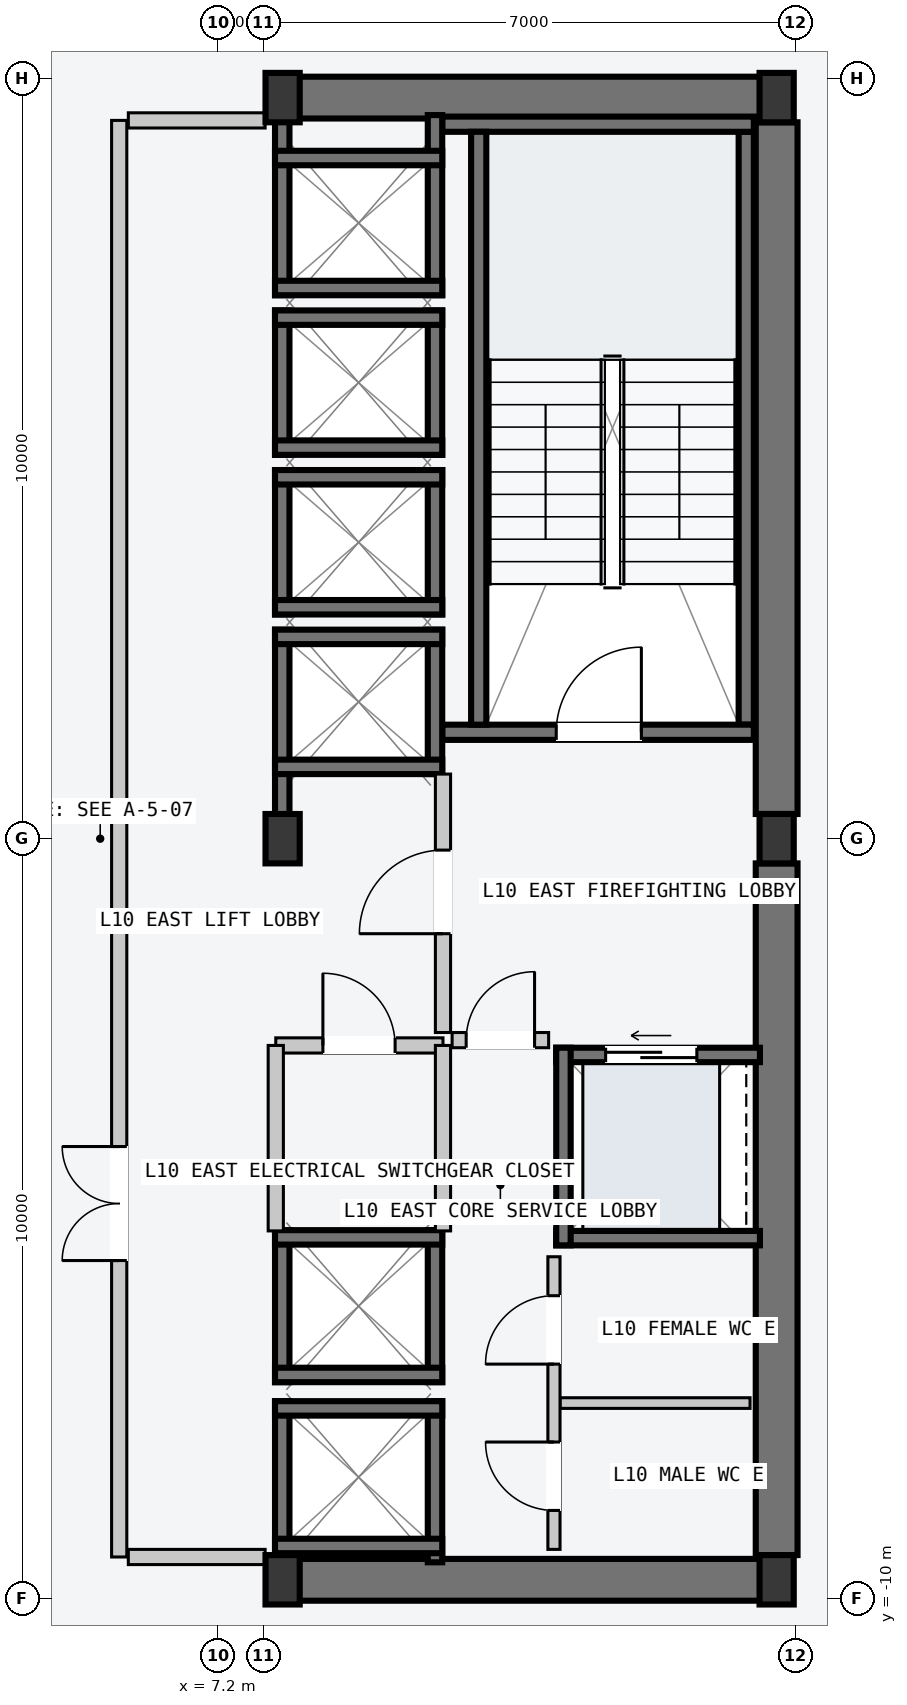
"""IFC4 building model, lengths in metres.
Left out: names, types, materials, properties, quantities, classifications, styles, units other than length and angle.
Written with IfcOpenShell. Run it as: python <this file> out.ifc"""

import sys

from ifc_helpers import new_model, si_unit, direction, frame, frame_2d, origin, origin_2d, place, context, subcontext, project, spatial, rectangle, i_section, extrude, element, fill, save


model = new_model("IFC4")
c1 = context("Model", 3, precision=1e-05, world=origin(), true_north=direction((0.0, 1.0)))
c2 = subcontext(c1, "Body", "Model", "MODEL_VIEW")
j1 = project(units=[si_unit("LENGTHUNIT", "METRE"), si_unit("PLANEANGLEUNIT", "RADIAN")], contexts=[c1])
p1 = place(None, origin())
s1 = spatial("IfcSite", under=j1, at=p1, CompositionType="ELEMENT")
p2 = place(p1, origin())
s2 = spatial("IfcBuilding", under=s1, at=p2, CompositionType="ELEMENT")
p3 = place(p2, frame((0.0, 0.0, 42.0)))
s3 = spatial("IfcBuildingStorey", under=s2, at=p3, CompositionType="ELEMENT", Elevation=42.0)
for number, where, z_axis, x_axis in (
    (1, (8.07, -9.75, -0.2), (0.0, 0.0, 1.0), (1.0, 0.0, 0.0)),
    (2, (8.07, 9.75, -0.2), (0.0, 0.0, 1.0), (1.0, 0.0, 0.0)),
):
    element("IfcWall", number, at=place(p3, frame(where, z_axis=z_axis, x_axis=x_axis)), inside=s3, PredefinedType="SHEAR", context=c2, shape_type="SweptSolid", body=[
        extrude(rectangle(XDim=6.46, YDim=0.55, at=frame_2d((3.23, 0.0))), origin(), (0.0, 0.0, 1.0), 3.6),
    ])
for number, where, z_axis, x_axis in (
    (3, (14.55, -9.425, -0.2), (0.0, 0.0, 1.0), (0.0, 1.0, 0.0)),
    (4, (14.55, 0.325, -0.2), (0.0, 0.0, 1.0), (0.0, 1.0, 0.0)),
):
    element("IfcWall", number, at=place(p3, frame(where, z_axis=z_axis, x_axis=x_axis)), inside=s3, PredefinedType="SHEAR", context=c2, shape_type="SweptSolid", body=[
        extrude(rectangle(XDim=9.1, YDim=0.55, at=frame_2d((4.55, 0.0))), origin(), (0.0, 0.0, 1.0), 3.6),
    ])
p4 = place(p3, frame((14.15, 1.5, -0.2), z_axis=(0.0, 0.0, 1.0), x_axis=(0.0, 1.0, 0.0)))
e5 = element("IfcWall", 5, at=p4, inside=s3, PredefinedType="SOLIDWALL", context=c2, shape_type="SweptSolid", body=[
    extrude(rectangle(XDim=7.8, YDim=0.2, at=frame_2d((3.9, 0.0))), origin(), (0.0, 0.0, 1.0), 3.6),
])
p5 = place(p3, frame((10.15, 1.4, -0.2), z_axis=(0.0, 0.0, 1.0), x_axis=(1.0, 0.0, 0.0)))
e6 = element("IfcWall", 6, at=p5, inside=s3, PredefinedType="SOLIDWALL", context=c2, shape_type="SweptSolid", body=[
    extrude(rectangle(XDim=4.1, YDim=0.2, at=frame_2d((2.05, 0.0))), origin(), (0.0, 0.0, 1.0), 3.6),
])
p6 = place(p5, frame((1.5, 0.0, 0.2)))
e7 = element("IfcOpeningElement", 7, at=p6, cuts=e6, PredefinedType="OPENING", context=c2, shape_type="SweptSolid", body=[
    extrude(rectangle(XDim=1.12, YDim=2.18, at=frame_2d((0.56, 1.09))), frame((0.0, 0.11, 0.0), z_axis=(0.0, -1.0, 0.0), x_axis=(1.0, 0.0, 0.0)), (0.0, 0.0, 1.0), 0.22),
])
p7 = place(p3, frame((10.15, 9.4, -0.2), z_axis=(0.0, 0.0, 1.0), x_axis=(1.0, 0.0, 0.0)))
e8 = element("IfcWall", 8, at=p7, inside=s3, PredefinedType="SOLIDWALL", context=c2, shape_type="SweptSolid", body=[
    extrude(rectangle(XDim=4.1, YDim=0.2, at=frame_2d((2.05, 0.0))), origin(), (0.0, 0.0, 1.0), 3.6),
])
p8 = place(p3, frame((10.63, 1.5, -0.2), z_axis=(0.0, 0.0, 1.0), x_axis=(0.0, 1.0, 0.0)))
e9 = element("IfcWall", 9, at=p8, inside=s3, PredefinedType="SOLIDWALL", context=c2, shape_type="SweptSolid", body=[
    extrude(rectangle(XDim=7.8, YDim=0.2, at=frame_2d((3.9, 0.0))), origin(), (0.0, 0.0, 1.0), 3.6),
])
for number, where, z_axis, x_axis in (
    (10, (8.05, -9.75, 0.0), (0.0, 0.0, 1.0), (1.0, 0.0, 0.0)),
    (11, (8.05, 0.0, 0.0), (0.0, 0.0, 1.0), (1.0, 0.0, 0.0)),
    (12, (8.05, 9.75, 0.0), (0.0, 0.0, 1.0), (1.0, 0.0, 0.0)),
    (13, (14.55, -9.75, 0.0), (0.0, 0.0, 1.0), (1.0, 0.0, 0.0)),
    (14, (14.55, 0.0, 0.0), (0.0, 0.0, 1.0), (1.0, 0.0, 0.0)),
    (15, (14.55, 9.75, 0.0), (0.0, 0.0, 1.0), (1.0, 0.0, 0.0)),
):
    element("IfcColumn", number, at=place(p3, frame(where, z_axis=z_axis, x_axis=x_axis)), inside=s3, PredefinedType="COLUMN", context=c2, shape_type="SweptSolid", body=[
        extrude(i_section(OverallWidth=0.45, OverallDepth=0.65, WebThickness=0.025, FlangeThickness=0.04, at=origin_2d()), origin(), (0.0, 0.0, 1.0), 3.6),
    ])
p9 = place(p3, frame((8.045, 0.21, -0.2), z_axis=(0.0, 0.0, 1.0), x_axis=(0.0, 1.0, 0.0)))
e16 = element("IfcWall", 16, at=p9, inside=s3, PredefinedType="SOLIDWALL", context=c2, shape_type="SweptSolid", body=[
    extrude(rectangle(XDim=2.54, YDim=0.19, at=frame_2d((1.27, 0.0))), origin(), (0.0, 0.0, 1.0), 3.6),
])
p10 = place(p3, frame((10.055, 0.85, -0.2), z_axis=(0.0, 0.0, 1.0), x_axis=(0.0, 1.0, 0.0)))
e17 = element("IfcWall", 17, at=p10, inside=s3, PredefinedType="SOLIDWALL", context=c2, shape_type="SweptSolid", body=[
    extrude(rectangle(XDim=1.9, YDim=0.19, at=frame_2d((0.95, 0.0))), origin(), (0.0, 0.0, 1.0), 3.6),
])
for number, where, z_axis, x_axis in (
    (18, (7.95, 2.655, -0.2), (0.0, 0.0, 1.0), (1.0, 0.0, 0.0)),
    (19, (7.95, 0.945, -0.2), (0.0, 0.0, 1.0), (1.0, 0.0, 0.0)),
):
    element("IfcWall", number, at=place(p3, frame(where, z_axis=z_axis, x_axis=x_axis)), inside=s3, PredefinedType="SOLIDWALL", context=c2, shape_type="SweptSolid", body=[
        extrude(rectangle(XDim=2.2, YDim=0.19, at=frame_2d((1.1, 0.0))), origin(), (0.0, 0.0, 1.0), 3.6),
    ])
for number, where, z_axis, x_axis in (
    (20, (8.045, 2.95, -0.2), (0.0, 0.0, 1.0), (0.0, 1.0, 0.0)),
    (21, (10.055, 2.95, -0.2), (0.0, 0.0, 1.0), (0.0, 1.0, 0.0)),
):
    element("IfcWall", number, at=place(p3, frame(where, z_axis=z_axis, x_axis=x_axis)), inside=s3, PredefinedType="SOLIDWALL", context=c2, shape_type="SweptSolid", body=[
        extrude(rectangle(XDim=1.9, YDim=0.19, at=frame_2d((0.95, 0.0))), origin(), (0.0, 0.0, 1.0), 3.6),
    ])
for number, where, z_axis, x_axis in (
    (22, (7.95, 4.755, -0.2), (0.0, 0.0, 1.0), (1.0, 0.0, 0.0)),
    (23, (7.95, 3.045, -0.2), (0.0, 0.0, 1.0), (1.0, 0.0, 0.0)),
):
    element("IfcWall", number, at=place(p3, frame(where, z_axis=z_axis, x_axis=x_axis)), inside=s3, PredefinedType="SOLIDWALL", context=c2, shape_type="SweptSolid", body=[
        extrude(rectangle(XDim=2.2, YDim=0.19, at=frame_2d((1.1, 0.0))), origin(), (0.0, 0.0, 1.0), 3.6),
    ])
for number, where, z_axis, x_axis in (
    (24, (8.045, 5.05, -0.2), (0.0, 0.0, 1.0), (0.0, 1.0, 0.0)),
    (25, (10.055, 5.05, -0.2), (0.0, 0.0, 1.0), (0.0, 1.0, 0.0)),
):
    element("IfcWall", number, at=place(p3, frame(where, z_axis=z_axis, x_axis=x_axis)), inside=s3, PredefinedType="SOLIDWALL", context=c2, shape_type="SweptSolid", body=[
        extrude(rectangle(XDim=1.9, YDim=0.19, at=frame_2d((0.95, 0.0))), origin(), (0.0, 0.0, 1.0), 3.6),
    ])
for number, where, z_axis, x_axis in (
    (26, (7.95, 6.855, -0.2), (0.0, 0.0, 1.0), (1.0, 0.0, 0.0)),
    (27, (7.95, 5.145, -0.2), (0.0, 0.0, 1.0), (1.0, 0.0, 0.0)),
):
    element("IfcWall", number, at=place(p3, frame(where, z_axis=z_axis, x_axis=x_axis)), inside=s3, PredefinedType="SOLIDWALL", context=c2, shape_type="SweptSolid", body=[
        extrude(rectangle(XDim=2.2, YDim=0.19, at=frame_2d((1.1, 0.0))), origin(), (0.0, 0.0, 1.0), 3.6),
    ])
for number, where, z_axis, x_axis in (
    (28, (8.045, 7.15, -0.2), (0.0, 0.0, 1.0), (0.0, 1.0, 0.0)),
    (29, (10.055, 7.15, -0.2), (0.0, 0.0, 1.0), (0.0, 1.0, 0.0)),
):
    element("IfcWall", number, at=place(p3, frame(where, z_axis=z_axis, x_axis=x_axis)), inside=s3, PredefinedType="SOLIDWALL", context=c2, shape_type="SweptSolid", body=[
        extrude(rectangle(XDim=2.37, YDim=0.19, at=frame_2d((1.185, 0.0))), origin(), (0.0, 0.0, 1.0), 3.6),
    ])
for number, where, z_axis, x_axis in (
    (30, (7.95, 8.955, -0.2), (0.0, 0.0, 1.0), (1.0, 0.0, 0.0)),
    (31, (7.95, 7.245, -0.2), (0.0, 0.0, 1.0), (1.0, 0.0, 0.0)),
):
    element("IfcWall", number, at=place(p3, frame(where, z_axis=z_axis, x_axis=x_axis)), inside=s3, PredefinedType="SOLIDWALL", context=c2, shape_type="SweptSolid", body=[
        extrude(rectangle(XDim=2.2, YDim=0.19, at=frame_2d((1.1, 0.0))), origin(), (0.0, 0.0, 1.0), 3.6),
    ])
for number, where, z_axis, x_axis in (
    (32, (8.045, -9.52, -0.2), (0.0, 0.0, 1.0), (0.0, 1.0, 0.0)),
    (33, (10.055, -9.52, -0.2), (0.0, 0.0, 1.0), (0.0, 1.0, 0.0)),
):
    element("IfcWall", number, at=place(p3, frame(where, z_axis=z_axis, x_axis=x_axis)), inside=s3, PredefinedType="SOLIDWALL", context=c2, shape_type="SweptSolid", body=[
        extrude(rectangle(XDim=2.12, YDim=0.19, at=frame_2d((1.06, 0.0))), origin(), (0.0, 0.0, 1.0), 3.6),
    ])
for number, where, z_axis, x_axis in (
    (34, (7.95, -7.495, -0.2), (0.0, 0.0, 1.0), (1.0, 0.0, 0.0)),
    (35, (7.95, -9.305, -0.2), (0.0, 0.0, 1.0), (1.0, 0.0, 0.0)),
):
    element("IfcWall", number, at=place(p3, frame(where, z_axis=z_axis, x_axis=x_axis)), inside=s3, PredefinedType="SOLIDWALL", context=c2, shape_type="SweptSolid", body=[
        extrude(rectangle(XDim=2.2, YDim=0.19, at=frame_2d((1.1, 0.0))), origin(), (0.0, 0.0, 1.0), 3.6),
    ])
for number, where, z_axis, x_axis in (
    (36, (8.045, -7.15, -0.2), (0.0, 0.0, 1.0), (0.0, 1.0, 0.0)),
    (37, (10.055, -7.15, -0.2), (0.0, 0.0, 1.0), (0.0, 1.0, 0.0)),
):
    element("IfcWall", number, at=place(p3, frame(where, z_axis=z_axis, x_axis=x_axis)), inside=s3, PredefinedType="SOLIDWALL", context=c2, shape_type="SweptSolid", body=[
        extrude(rectangle(XDim=2.0, YDim=0.19, at=frame_2d((1.0, 0.0))), origin(), (0.0, 0.0, 1.0), 3.6),
    ])
for number, where, z_axis, x_axis in (
    (38, (7.95, -5.245, -0.2), (0.0, 0.0, 1.0), (1.0, 0.0, 0.0)),
    (39, (7.95, -7.055, -0.2), (0.0, 0.0, 1.0), (1.0, 0.0, 0.0)),
):
    element("IfcWall", number, at=place(p3, frame(where, z_axis=z_axis, x_axis=x_axis)), inside=s3, PredefinedType="SOLIDWALL", context=c2, shape_type="SweptSolid", body=[
        extrude(rectangle(XDim=2.2, YDim=0.19, at=frame_2d((1.1, 0.0))), origin(), (0.0, 0.0, 1.0), 3.6),
    ])
p11 = place(p3, frame((11.65, -2.845, -0.2), z_axis=(0.0, 0.0, 1.0), x_axis=(1.0, 0.0, 0.0)))
e40 = element("IfcWall", 40, at=p11, inside=s3, PredefinedType="SOLIDWALL", context=c2, shape_type="SweptSolid", body=[
    extrude(rectangle(XDim=2.68, YDim=0.19, at=frame_2d((1.34, 0.0))), origin(), (0.0, 0.0, 1.0), 3.6),
])
p12 = place(p11, frame((0.65, 0.0, 0.2)))
e41 = element("IfcOpeningElement", 41, at=p12, cuts=e40, PredefinedType="OPENING", context=c2, shape_type="SweptSolid", body=[
    extrude(rectangle(XDim=1.2, YDim=2.2, at=frame_2d((0.6, 1.1))), frame((0.0, 0.105, 0.0), z_axis=(0.0, -1.0, 0.0), x_axis=(1.0, 0.0, 0.0)), (0.0, 0.0, 1.0), 0.21),
])
p13 = place(p3, frame((11.65, -5.255, -0.2), z_axis=(0.0, 0.0, 1.0), x_axis=(1.0, 0.0, 0.0)))
e42 = element("IfcWall", 42, at=p13, inside=s3, PredefinedType="SOLIDWALL", context=c2, shape_type="SweptSolid", body=[
    extrude(rectangle(XDim=2.68, YDim=0.19, at=frame_2d((1.34, 0.0))), origin(), (0.0, 0.0, 1.0), 3.6),
])
p14 = place(p3, frame((11.745, -5.35, -0.2), z_axis=(0.0, 0.0, 1.0), x_axis=(0.0, 1.0, 0.0)))
e43 = element("IfcWall", 43, at=p14, inside=s3, PredefinedType="SOLIDWALL", context=c2, shape_type="SweptSolid", body=[
    extrude(rectangle(XDim=2.6, YDim=0.19, at=frame_2d((1.3, 0.0))), origin(), (0.0, 0.0, 1.0), 3.6),
])
p15 = place(p3, frame((5.9, -9.45, 0.0), z_axis=(0.0, 0.0, 1.0), x_axis=(0.0, 1.0, 0.0)))
e44 = element("IfcWall", 44, at=p15, inside=s3, PredefinedType="PARTITIONING", context=c2, shape_type="SweptSolid", body=[
    extrude(rectangle(XDim=18.9, YDim=0.2, at=frame_2d((9.45, 0.0))), origin(), (0.0, 0.0, 1.0), 3.4),
])
p16 = place(p15, frame((3.9, 0.0, 0.0)))
e45 = element("IfcOpeningElement", 45, at=p16, cuts=e44, PredefinedType="OPENING", context=c2, shape_type="SweptSolid", body=[
    extrude(rectangle(XDim=1.5, YDim=2.2, at=frame_2d((0.75, 1.1))), frame((0.0, 0.11, 0.0), z_axis=(0.0, -1.0, 0.0), x_axis=(1.0, 0.0, 0.0)), (0.0, 0.0, 1.0), 0.22),
])
for number, where, z_axis, x_axis in (
    (46, (6.02, -9.45, 0.0), (0.0, 0.0, 1.0), (1.0, 0.0, 0.0)),
    (47, (6.02, 9.45, 0.0), (0.0, 0.0, 1.0), (1.0, 0.0, 0.0)),
):
    element("IfcWall", number, at=place(p3, frame(where, z_axis=z_axis, x_axis=x_axis)), inside=s3, PredefinedType="PARTITIONING", context=c2, shape_type="SweptSolid", body=[
        extrude(rectangle(XDim=1.8, YDim=0.2, at=frame_2d((0.9, 0.0))), origin(), (0.0, 0.0, 1.0), 3.4),
    ])
p17 = place(p3, frame((10.16, -2.55, 0.0), z_axis=(0.0, 0.0, 1.0), x_axis=(0.0, 1.0, 0.0)))
e48 = element("IfcWall", 48, at=p17, inside=s3, PredefinedType="PARTITIONING", context=c2, shape_type="SweptSolid", body=[
    extrude(rectangle(XDim=3.4, YDim=0.2, at=frame_2d((1.7, 0.0))), origin(), (0.0, 0.0, 1.0), 3.4),
])
p18 = place(p17, frame((1.3, 0.0, 0.0)))
e49 = element("IfcOpeningElement", 49, at=p18, cuts=e48, PredefinedType="OPENING", context=c2, shape_type="SweptSolid", body=[
    extrude(rectangle(XDim=1.1, YDim=2.15, at=frame_2d((0.55, 1.075))), frame((0.0, 0.11, 0.0), z_axis=(0.0, -1.0, 0.0), x_axis=(1.0, 0.0, 0.0)), (0.0, 0.0, 1.0), 0.22),
])
p19 = place(p3, frame((10.28, -2.65, 0.0), z_axis=(0.0, 0.0, 1.0), x_axis=(1.0, 0.0, 0.0)))
e50 = element("IfcWall", 50, at=p19, inside=s3, PredefinedType="PARTITIONING", context=c2, shape_type="SweptSolid", body=[
    extrude(rectangle(XDim=1.27, YDim=0.2, at=frame_2d((0.635, 0.0))), origin(), (0.0, 0.0, 1.0), 3.4),
])
p20 = place(p19, frame((0.185, 0.0, 0.0)))
e51 = element("IfcOpeningElement", 51, at=p20, cuts=e50, PredefinedType="OPENING", context=c2, shape_type="SweptSolid", body=[
    extrude(rectangle(XDim=0.9, YDim=2.15, at=frame_2d((0.45, 1.075))), frame((0.0, 0.11, 0.0), z_axis=(0.0, -1.0, 0.0), x_axis=(1.0, 0.0, 0.0)), (0.0, 0.0, 1.0), 0.22),
])
p21 = place(p3, frame((7.96, -2.72, 0.0), z_axis=(0.0, 0.0, 1.0), x_axis=(1.0, 0.0, 0.0)))
e52 = element("IfcWall", 52, at=p21, inside=s3, PredefinedType="PARTITIONING", context=c2, shape_type="SweptSolid", body=[
    extrude(rectangle(XDim=2.2, YDim=0.2, at=frame_2d((1.1, 0.0))), origin(), (0.0, 0.0, 1.0), 3.4),
])
p22 = place(p21, frame((0.62, 0.0, 0.0)))
e53 = element("IfcOpeningElement", 53, at=p22, cuts=e52, PredefinedType="OPENING", context=c2, shape_type="SweptSolid", body=[
    extrude(rectangle(XDim=0.95, YDim=2.1, at=frame_2d((0.475, 1.05))), frame((0.0, 0.11, 0.0), z_axis=(0.0, -1.0, 0.0), x_axis=(1.0, 0.0, 0.0)), (0.0, 0.0, 1.0), 0.22),
])
for number, where, z_axis, x_axis in (
    (54, (7.96, -5.16, 0.0), (0.0, 0.0, 1.0), (0.0, 1.0, 0.0)),
    (55, (10.16, -5.16, 0.0), (0.0, 0.0, 1.0), (0.0, 1.0, 0.0)),
):
    element("IfcWall", number, at=place(p3, frame(where, z_axis=z_axis, x_axis=x_axis)), inside=s3, PredefinedType="PARTITIONING", context=c2, shape_type="SweptSolid", body=[
        extrude(rectangle(XDim=2.44, YDim=0.2, at=frame_2d((1.22, 0.0))), origin(), (0.0, 0.0, 1.0), 3.4),
    ])
p23 = place(p3, frame((11.7, -7.425, 0.0), z_axis=(0.0, 0.0, 1.0), x_axis=(1.0, 0.0, 0.0)))
e56 = element("IfcWall", 56, at=p23, inside=s3, PredefinedType="PARTITIONING", context=c2, shape_type="SweptSolid", body=[
    extrude(rectangle(XDim=2.5, YDim=0.14, at=frame_2d((1.25, 0.0))), origin(), (0.0, 0.0, 1.0), 3.4),
])
p24 = place(p3, frame((11.62, -9.35, 0.0), z_axis=(0.0, 0.0, 1.0), x_axis=(0.0, 1.0, 0.0)))
e57 = element("IfcWall", 57, at=p24, inside=s3, PredefinedType="PARTITIONING", context=c2, shape_type="SweptSolid", body=[
    extrude(rectangle(XDim=3.85, YDim=0.16, at=frame_2d((1.925, 0.0))), origin(), (0.0, 0.0, 1.0), 3.4),
])
p25 = place(p24, frame((0.512, 0.0, 0.0)))
e58 = element("IfcOpeningElement", 58, at=p25, cuts=e57, PredefinedType="OPENING", context=c2, shape_type="SweptSolid", body=[
    extrude(rectangle(XDim=0.9, YDim=2.15, at=frame_2d((0.45, 1.075))), frame((0.0, 0.09, 0.0), z_axis=(0.0, -1.0, 0.0), x_axis=(1.0, 0.0, 0.0)), (0.0, 0.0, 1.0), 0.18),
])
p26 = place(p24, frame((2.438, 0.0, 0.0)))
e59 = element("IfcOpeningElement", 59, at=p26, cuts=e57, PredefinedType="OPENING", context=c2, shape_type="SweptSolid", body=[
    extrude(rectangle(XDim=0.9, YDim=2.15, at=frame_2d((0.45, 1.075))), frame((0.0, 0.09, 0.0), z_axis=(0.0, -1.0, 0.0), x_axis=(1.0, 0.0, 0.0)), (0.0, 0.0, 1.0), 0.18),
])
p27 = place(p6, origin())
e60 = element("IfcDoor", 60, at=p27, inside=s3, OperationType="SINGLE_SWING_RIGHT", PredefinedType="DOOR", context=c2, shape_type="SweptSolid", body=[
    extrude(rectangle(XDim=1.12, YDim=2.18, at=frame_2d((0.56, 1.09))), frame((0.0, 0.025, 0.0), z_axis=(0.0, -1.0, 0.0), x_axis=(1.0, 0.0, 0.0)), (0.0, 0.0, 1.0), 0.05),
])
fill(e7, e60)
p28 = place(p12, origin())
e61 = element("IfcDoor", 61, at=p28, inside=s3, OperationType="SLIDING_TO_LEFT", PredefinedType="DOOR", context=c2, shape_type="SweptSolid", body=[
    extrude(rectangle(XDim=1.2, YDim=2.2, at=frame_2d((0.6, 1.1))), frame((0.0, 0.025, 0.0), z_axis=(0.0, -1.0, 0.0), x_axis=(1.0, 0.0, 0.0)), (0.0, 0.0, 1.0), 0.05),
])
fill(e41, e61)
p29 = place(p16, origin())
e62 = element("IfcDoor", 62, at=p29, inside=s3, OperationType="DOUBLE_DOOR_SINGLE_SWING", PredefinedType="DOOR", context=c2, shape_type="SweptSolid", body=[
    extrude(rectangle(XDim=1.5, YDim=2.2, at=frame_2d((0.75, 1.1))), frame((0.0, 0.025, 0.0), z_axis=(0.0, -1.0, 0.0), x_axis=(1.0, 0.0, 0.0)), (0.0, 0.0, 1.0), 0.05),
])
fill(e45, e62)
p30 = place(p18, origin())
e63 = element("IfcDoor", 63, at=p30, inside=s3, OperationType="SINGLE_SWING_LEFT", PredefinedType="DOOR", context=c2, shape_type="SweptSolid", body=[
    extrude(rectangle(XDim=1.1, YDim=2.15, at=frame_2d((0.55, 1.075))), frame((0.0, 0.025, 0.0), z_axis=(0.0, -1.0, 0.0), x_axis=(1.0, 0.0, 0.0)), (0.0, 0.0, 1.0), 0.05),
])
fill(e49, e63)
p31 = place(p20, origin())
e64 = element("IfcDoor", 64, at=p31, inside=s3, OperationType="SINGLE_SWING_RIGHT", PredefinedType="DOOR", context=c2, shape_type="SweptSolid", body=[
    extrude(rectangle(XDim=0.9, YDim=2.15, at=frame_2d((0.45, 1.075))), frame((0.0, 0.025, 0.0), z_axis=(0.0, -1.0, 0.0), x_axis=(1.0, 0.0, 0.0)), (0.0, 0.0, 1.0), 0.05),
])
fill(e51, e64)
p32 = place(p22, origin())
e65 = element("IfcDoor", 65, at=p32, inside=s3, OperationType="SINGLE_SWING_LEFT", PredefinedType="DOOR", context=c2, shape_type="SweptSolid", body=[
    extrude(rectangle(XDim=0.95, YDim=2.1, at=frame_2d((0.475, 1.05))), frame((0.0, 0.025, 0.0), z_axis=(0.0, -1.0, 0.0), x_axis=(1.0, 0.0, 0.0)), (0.0, 0.0, 1.0), 0.05),
])
fill(e53, e65)
p33 = place(p25, origin())
e66 = element("IfcDoor", 66, at=p33, inside=s3, OperationType="SINGLE_SWING_RIGHT", PredefinedType="DOOR", context=c2, shape_type="SweptSolid", body=[
    extrude(rectangle(XDim=0.9, YDim=2.15, at=frame_2d((0.45, 1.075))), frame((0.0, 0.025, 0.0), z_axis=(0.0, -1.0, 0.0), x_axis=(1.0, 0.0, 0.0)), (0.0, 0.0, 1.0), 0.05),
])
fill(e58, e66)
p34 = place(p26, origin())
e67 = element("IfcDoor", 67, at=p34, inside=s3, OperationType="SINGLE_SWING_LEFT", PredefinedType="DOOR", context=c2, shape_type="SweptSolid", body=[
    extrude(rectangle(XDim=0.9, YDim=2.15, at=frame_2d((0.45, 1.075))), frame((0.0, 0.025, 0.0), z_axis=(0.0, -1.0, 0.0), x_axis=(1.0, 0.0, 0.0)), (0.0, 0.0, 1.0), 0.05),
])
fill(e59, e67)
save(model, sys.argv[1])
